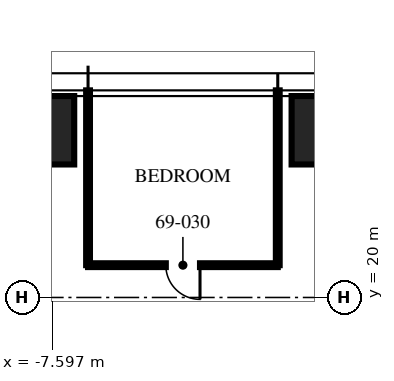
"""IFC4 building model, lengths in metres.
Left out: names, types, materials, properties, quantities, classifications, styles, units other than length and angle.
Written with IfcOpenShell. Run it as: python <this file> out.ifc"""

import sys

from ifc_helpers import new_model, si_unit, direction, frame, frame_2d, origin, origin_2d, place, context, subcontext, project, spatial, rectangle, hollow_rectangle, extrude, element, fill, save


model = new_model("IFC4")
c1 = context("Model", 3, precision=1e-05, world=origin(), true_north=direction((0.0, 1.0)))
c2 = subcontext(c1, "Body", "Model", "MODEL_VIEW")
j1 = project(units=[si_unit("LENGTHUNIT", "METRE"), si_unit("PLANEANGLEUNIT", "RADIAN")], contexts=[c1])
p1 = place(None, origin())
s1 = spatial("IfcSite", under=j1, at=p1, CompositionType="ELEMENT")
p2 = place(p1, origin())
s2 = spatial("IfcBuilding", under=s1, at=p2, CompositionType="ELEMENT")
p3 = place(p2, frame((0.0, 0.0, 274.5)))
s3 = spatial("IfcBuildingStorey", under=s2, at=p3, CompositionType="ELEMENT", Elevation=274.5)
p4 = place(p3, frame((-8.32, 24.4, 0.0), z_axis=(0.0, 0.0, 1.0), x_axis=(1.0, 0.0, 0.0)))
e1 = element("IfcColumn", 1, at=p4, inside=s3, PredefinedType="COLUMN", context=c2, shape_type="SweptSolid", body=[
    extrude(hollow_rectangle(XDim=2.6, YDim=1.8, WallThickness=0.14, at=origin_2d()), origin(), (0.0, 0.0, 1.0), 2.64),
])
p5 = place(p3, frame((0.0, 24.4, 0.0), z_axis=(0.0, 0.0, 1.0), x_axis=(1.0, 0.0, 0.0)))
e2 = element("IfcColumn", 2, at=p5, inside=s3, PredefinedType="COLUMN", context=c2, shape_type="SweptSolid", body=[
    extrude(hollow_rectangle(XDim=2.6, YDim=1.8, WallThickness=0.14, at=origin_2d()), origin(), (0.0, 0.0, 1.0), 2.78),
])
for number, where, z_axis, x_axis in (
    (3, (-1.664, 20.85, 0.0), (0.0, 0.0, 1.0), (0.0, 1.0, 0.0)),
    (4, (-6.656, 20.85, 0.0), (0.0, 0.0, 1.0), (0.0, 1.0, 0.0)),
):
    element("IfcWall", number, at=place(p3, frame(where, z_axis=z_axis, x_axis=x_axis)), inside=s3, PredefinedType="PARTITIONING", context=c2, shape_type="SweptSolid", body=[
        extrude(rectangle(XDim=4.6, YDim=0.1, at=frame_2d((2.3, 0.0))), origin(), (0.0, 0.0, 1.0), 2.75),
    ])
p6 = place(p3, frame((-1.664, 20.85, 0.0), z_axis=(0.0, 0.0, 1.0), x_axis=(-1.0, 0.0, 0.0)))
e5 = element("IfcWall", 5, at=p6, inside=s3, PredefinedType="PARTITIONING", context=c2, shape_type="SweptSolid", body=[
    extrude(rectangle(XDim=4.992, YDim=0.1, at=frame_2d((2.496, 0.0))), origin(), (0.0, 0.0, 1.0), 2.2),
])
p7 = place(p6, frame((2.046, 0.0, 0.0)))
e6 = element("IfcOpeningElement", 6, at=p7, cuts=e5, PredefinedType="OPENING", context=c2, shape_type="SweptSolid", body=[
    extrude(rectangle(XDim=0.9, YDim=2.1, at=frame_2d((0.45, 1.05))), frame((0.0, 0.06, 0.0), z_axis=(0.0, -1.0, 0.0), x_axis=(1.0, 0.0, 0.0)), (0.0, 0.0, 1.0), 0.12),
])
p8 = place(p7, origin())
e7 = element("IfcDoor", 7, at=p8, inside=s3, OperationType="SINGLE_SWING_LEFT", PredefinedType="DOOR", context=c2, shape_type="SweptSolid", body=[
    extrude(rectangle(XDim=0.9, YDim=2.1, at=frame_2d((0.45, 1.05))), frame((0.0, 0.025, 0.0), z_axis=(0.0, -1.0, 0.0), x_axis=(1.0, 0.0, 0.0)), (0.0, 0.0, 1.0), 0.05),
])
fill(e6, e7)
save(model, sys.argv[1])
